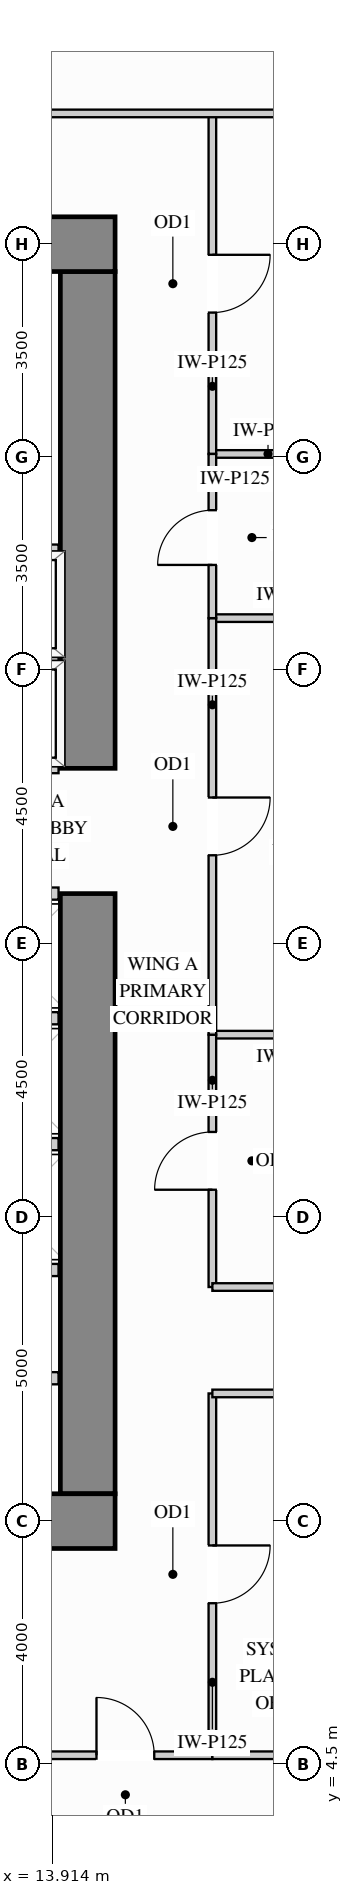
"""IFC4 building model, lengths in metres.
Left out: names, types, materials, properties, quantities, classifications, styles, units other than length and angle.
Written with IfcOpenShell. Run it as: python <this file> out.ifc"""

import sys

from ifc_helpers import new_model, si_unit, direction, frame, frame_2d, origin, place, context, subcontext, project, spatial, rectangle, extrude, source, transform, mapped, element, fill, save


model = new_model("IFC4")
c1 = context("Model", 3, precision=1e-05, world=origin(), true_north=direction((0.0, 1.0)))
c2 = subcontext(c1, "Body", "Model", "MODEL_VIEW")
j1 = project(units=[si_unit("LENGTHUNIT", "METRE"), si_unit("PLANEANGLEUNIT", "RADIAN")], contexts=[c1])
p1 = place(None, origin())
s1 = spatial("IfcSite", under=j1, at=p1, CompositionType="ELEMENT")
p2 = place(p1, origin())
s2 = spatial("IfcBuilding", under=s1, at=p2, CompositionType="ELEMENT")
p3 = place(p2, frame((0.0, 0.0, 22.5)))
s3 = spatial("IfcBuildingStorey", under=s2, at=p3, CompositionType="ELEMENT", Elevation=22.5)
m1 = source(origin(), c2, "Body", "SweptSolid", [
    extrude(rectangle(XDim=9.87, YDim=0.9, at=frame_2d((4.935, 0.0))), origin(), (0.0, 0.0, 1.0), 3.38),
])
p4 = place(p3, frame((14.5, 8.95, 0.0), z_axis=(0.0, 0.0, 1.0), x_axis=(0.0, 1.0, 0.0)))
e1 = element("IfcWall", 1, at=p4, inside=s3, PredefinedType="SHEAR", context=c2, shape_type="MappedRepresentation", body=[
    mapped(m1, transform((0.0, 0.0, 0.0), x_axis=(1.0, 0.0, 0.0), y_axis=(0.0, 1.0, 0.0), z_axis=(0.0, 0.0, 1.0))),
])
m2 = source(origin(), c2, "Body", "SweptSolid", [
    extrude(rectangle(XDim=8.17, YDim=0.9, at=frame_2d((4.085, 0.0))), origin(), (0.0, 0.0, 1.0), 3.38),
])
p5 = place(p3, frame((14.5, 20.88, 0.0), z_axis=(0.0, 0.0, 1.0), x_axis=(0.0, 1.0, 0.0)))
e2 = element("IfcWall", 2, at=p5, inside=s3, PredefinedType="SHEAR", context=c2, shape_type="MappedRepresentation", body=[
    mapped(m2, transform((0.0, 0.0, 0.0), x_axis=(1.0, 0.0, 0.0), y_axis=(0.0, 1.0, 0.0), z_axis=(0.0, 0.0, 1.0))),
])
m3 = source(origin(), c2, "Body", "SweptSolid", [
    extrude(rectangle(XDim=10.9, YDim=0.9, at=frame_2d((5.45, 0.0))), origin(), (0.0, 0.0, 1.0), 3.38),
])
for number, where, z_axis, x_axis in (
    (3, (4.05, 29.5, 0.0), (0.0, 0.0, 1.0), (1.0, 0.0, 0.0)),
    (4, (4.05, 8.5, 0.0), (0.0, 0.0, 1.0), (1.0, 0.0, 0.0)),
):
    element("IfcWall", number, at=place(p3, frame(where, z_axis=z_axis, x_axis=x_axis)), inside=s3, PredefinedType="SHEAR", context=c2, shape_type="MappedRepresentation", body=[
        mapped(m3, transform((0.0, 0.0, 0.0), x_axis=(1.0, 0.0, 0.0), y_axis=(0.0, 1.0, 0.0), z_axis=(0.0, 0.0, 1.0))),
    ])
m4 = source(origin(), c2, "Body", "SweptSolid", [
    extrude(rectangle(XDim=2.6, YDim=0.125, at=frame_2d((1.3, 0.0))), origin(), (0.0, 0.0, 1.0), 2.896),
])
p6 = place(p3, frame((16.55, 16.5, 0.0), z_axis=(0.0, 0.0, 1.0), x_axis=(1.0, 0.0, 0.0)))
e5 = element("IfcWall", 5, at=p6, inside=s3, PredefinedType="PARTITIONING", context=c2, shape_type="MappedRepresentation", body=[
    mapped(m4, transform((0.0, 0.0, 0.0), x_axis=(1.0, 0.0, 0.0), y_axis=(0.0, 1.0, 0.0), z_axis=(0.0, 0.0, 1.0))),
])
m5 = source(origin(), c2, "Body", "SweptSolid", [
    extrude(rectangle(XDim=2.598, YDim=0.125, at=frame_2d((1.299, 0.0))), origin(), (0.0, 0.0, 1.0), 3.365),
])
for number, where, z_axis, x_axis in (
    (6, (16.55, 23.35, 0.0), (0.0, 0.0, 1.0), (1.0, 0.0, 0.0)),
    (7, (16.55, 26.05, 0.0), (0.0, 0.0, 1.0), (1.0, 0.0, 0.0)),
):
    element("IfcWall", number, at=place(p3, frame(where, z_axis=z_axis, x_axis=x_axis)), inside=s3, PredefinedType="PARTITIONING", context=c2, shape_type="MappedRepresentation", body=[
        mapped(m5, transform((0.0, 0.0, 0.0), x_axis=(1.0, 0.0, 0.0), y_axis=(0.0, 1.0, 0.0), z_axis=(0.0, 0.0, 1.0))),
    ])
p7 = place(p3, frame((16.55, 12.35, 0.0), z_axis=(0.0, 0.0, 1.0), x_axis=(0.0, 1.0, 0.0)))
e8 = element("IfcWall", 8, at=p7, inside=s3, PredefinedType="PARTITIONING", context=c2, shape_type="SweptSolid", body=[
    extrude(rectangle(XDim=4.15, YDim=0.125, at=frame_2d((2.075, 0.0))), origin(), (0.0, 0.0, 1.0), 3.365),
])
p8 = place(p7, frame((1.6, 0.0, 0.0)))
e9 = element("IfcOpeningElement", 9, at=p8, cuts=e8, PredefinedType="OPENING", context=c2, shape_type="SweptSolid", body=[
    extrude(rectangle(XDim=0.95, YDim=2.15, at=frame_2d((0.475, 1.075))), frame((0.0, 0.073, 0.0), z_axis=(0.0, -1.0, 0.0), x_axis=(1.0, 0.0, 0.0)), (0.0, 0.0, 1.0), 0.145),
])
p9 = place(p3, frame((16.55, 16.5, 0.0), z_axis=(0.0, 0.0, 1.0), x_axis=(0.0, 1.0, 0.0)))
e10 = element("IfcWall", 10, at=p9, inside=s3, PredefinedType="PARTITIONING", context=c2, shape_type="SweptSolid", body=[
    extrude(rectangle(XDim=6.85, YDim=0.125, at=frame_2d((3.425, 0.0))), origin(), (0.0, 0.0, 1.0), 3.365),
])
p10 = place(p9, frame((2.95, 0.0, 0.0)))
e11 = element("IfcOpeningElement", 11, at=p10, cuts=e10, PredefinedType="OPENING", context=c2, shape_type="SweptSolid", body=[
    extrude(rectangle(XDim=0.95, YDim=2.15, at=frame_2d((0.475, 1.075))), frame((0.0, 0.073, 0.0), z_axis=(0.0, -1.0, 0.0), x_axis=(1.0, 0.0, 0.0)), (0.0, 0.0, 1.0), 0.145),
])
p11 = place(p3, frame((16.55, 26.05, 0.0), z_axis=(0.0, 0.0, 1.0), x_axis=(0.0, 1.0, 0.0)))
e12 = element("IfcWall", 12, at=p11, inside=s3, PredefinedType="PARTITIONING", context=c2, shape_type="SweptSolid", body=[
    extrude(rectangle(XDim=5.6, YDim=0.125, at=frame_2d((2.8, 0.0))), origin(), (0.0, 0.0, 1.0), 3.365),
])
p12 = place(p11, frame((2.325, 0.0, 0.0)))
e13 = element("IfcOpeningElement", 13, at=p12, cuts=e12, PredefinedType="OPENING", context=c2, shape_type="SweptSolid", body=[
    extrude(rectangle(XDim=0.95, YDim=2.15, at=frame_2d((0.475, 1.075))), frame((0.0, 0.073, 0.0), z_axis=(0.0, -1.0, 0.0), x_axis=(1.0, 0.0, 0.0)), (0.0, 0.0, 1.0), 0.145),
])
p13 = place(p3, frame((16.55, 4.65, 0.0), z_axis=(0.0, 0.0, 1.0), x_axis=(0.0, 1.0, 0.0)))
e14 = element("IfcWall", 14, at=p13, inside=s3, PredefinedType="PARTITIONING", context=c2, shape_type="SweptSolid", body=[
    extrude(rectangle(XDim=5.95, YDim=0.125, at=frame_2d((2.975, 0.0))), origin(), (0.0, 0.0, 1.0), 3.365),
])
p14 = place(p13, frame((2.5, 0.0, 0.0)))
e15 = element("IfcOpeningElement", 15, at=p14, cuts=e14, PredefinedType="OPENING", context=c2, shape_type="SweptSolid", body=[
    extrude(rectangle(XDim=0.95, YDim=2.15, at=frame_2d((0.475, 1.075))), frame((0.0, 0.073, 0.0), z_axis=(0.0, -1.0, 0.0), x_axis=(1.0, 0.0, 0.0)), (0.0, 0.0, 1.0), 0.145),
])
p15 = place(p3, frame((16.55, 23.35, 0.0), z_axis=(0.0, 0.0, 1.0), x_axis=(0.0, 1.0, 0.0)))
e16 = element("IfcWall", 16, at=p15, inside=s3, PredefinedType="PARTITIONING", context=c2, shape_type="SweptSolid", body=[
    extrude(rectangle(XDim=2.7, YDim=0.125, at=frame_2d((1.35, 0.0))), origin(), (0.0, 0.0, 1.0), 3.365),
])
p16 = place(p15, frame((0.875, 0.0, 0.0)))
e17 = element("IfcOpeningElement", 17, at=p16, cuts=e16, PredefinedType="OPENING", context=c2, shape_type="SweptSolid", body=[
    extrude(rectangle(XDim=0.9, YDim=2.15, at=frame_2d((0.45, 1.075))), frame((0.0, 0.073, 0.0), z_axis=(0.0, -1.0, 0.0), x_axis=(1.0, 0.0, 0.0)), (0.0, 0.0, 1.0), 0.145),
])
m6 = source(origin(), c2, "Body", "SweptSolid", [
    extrude(rectangle(XDim=12.598, YDim=0.125, at=frame_2d((6.299, 0.0))), origin(), (0.0, 0.0, 1.0), 2.828),
])
p17 = place(p3, frame((6.55, 31.65, 0.0), z_axis=(0.0, 0.0, 1.0), x_axis=(1.0, 0.0, 0.0)))
e18 = element("IfcWall", 18, at=p17, inside=s3, PredefinedType="PARTITIONING", context=c2, shape_type="MappedRepresentation", body=[
    mapped(m6, transform((0.0, 0.0, 0.0), x_axis=(1.0, 0.0, 0.0), y_axis=(0.0, 1.0, 0.0), z_axis=(0.0, 0.0, 1.0))),
])
m7 = source(origin(), c2, "Body", "SweptSolid", [
    extrude(rectangle(XDim=2.95, YDim=0.125, at=frame_2d((1.475, 0.0))), origin(), (0.0, 0.0, 1.0), 3.365),
])
for number, where, z_axis, x_axis in (
    (19, (16.55, 12.35, 0.0), (0.0, 0.0, 1.0), (1.0, 0.0, 0.0)),
    (20, (16.55, 10.6, 0.0), (0.0, 0.0, 1.0), (1.0, 0.0, 0.0)),
):
    element("IfcWall", number, at=place(p3, frame(where, z_axis=z_axis, x_axis=x_axis)), inside=s3, PredefinedType="PARTITIONING", context=c2, shape_type="MappedRepresentation", body=[
        mapped(m7, transform((0.0, 0.0, 0.0), x_axis=(1.0, 0.0, 0.0), y_axis=(0.0, 1.0, 0.0), z_axis=(0.0, 0.0, 1.0))),
    ])
p18 = place(p3, frame((13.688, 4.65, 0.0), z_axis=(0.0, 0.0, 1.0), x_axis=(1.0, 0.0, 0.0)))
e21 = element("IfcWall", 21, at=p18, inside=s3, PredefinedType="PARTITIONING", context=c2, shape_type="SweptSolid", body=[
    extrude(rectangle(XDim=2.862, YDim=0.125, at=frame_2d((1.431, 0.0))), origin(), (0.0, 0.0, 1.0), 2.828),
])
p19 = place(p18, frame((0.956, 0.0, 0.0)))
e22 = element("IfcOpeningElement", 22, at=p19, cuts=e21, PredefinedType="OPENING", context=c2, shape_type="SweptSolid", body=[
    extrude(rectangle(XDim=0.95, YDim=2.15, at=frame_2d((0.475, 1.075))), frame((0.0, 0.073, 0.0), z_axis=(0.0, -1.0, 0.0), x_axis=(1.0, 0.0, 0.0)), (0.0, 0.0, 1.0), 0.145),
])
m8 = source(origin(), c2, "Body", "SweptSolid", [
    extrude(rectangle(XDim=2.598, YDim=0.125, at=frame_2d((1.299, 0.0))), origin(), (0.0, 0.0, 1.0), 2.828),
])
p20 = place(p3, frame((16.55, 4.65, 0.0), z_axis=(0.0, 0.0, 1.0), x_axis=(1.0, 0.0, 0.0)))
e23 = element("IfcWall", 23, at=p20, inside=s3, PredefinedType="PARTITIONING", context=c2, shape_type="MappedRepresentation", body=[
    mapped(m8, transform((0.0, 0.0, 0.0), x_axis=(1.0, 0.0, 0.0), y_axis=(0.0, 1.0, 0.0), z_axis=(0.0, 0.0, 1.0))),
])
m9 = source(origin(), c2, "Body", "SweptSolid", [
    extrude(rectangle(XDim=1.6, YDim=0.2, at=frame_2d((0.8, 0.0))), origin(), (0.0, 0.0, 1.0), 3.365),
])
p21 = place(p3, frame((12.42, 10.85, 0.0), z_axis=(0.0, 0.0, 1.0), x_axis=(1.0, 0.0, 0.0)))
e24 = element("IfcWall", 24, at=p21, inside=s3, PredefinedType="PARTITIONING", context=c2, shape_type="MappedRepresentation", body=[
    mapped(m9, transform((0.0, 0.0, 0.0), x_axis=(1.0, 0.0, 0.0), y_axis=(0.0, 1.0, 0.0), z_axis=(0.0, 0.0, 1.0))),
])
m10 = source(origin(), c2, "Body", "SweptSolid", [
    extrude(rectangle(XDim=2.19, YDim=0.2, at=frame_2d((1.095, 0.0))), origin(), (0.0, 0.0, 1.0), 3.365),
])
for number, where, z_axis, x_axis in (
    (25, (11.83, 22.66, 0.0), (0.0, 0.0, 1.0), (1.0, 0.0, 0.0)),
    (26, (11.83, 20.9, 0.0), (0.0, 0.0, 1.0), (1.0, 0.0, 0.0)),
    (27, (11.83, 24.46, 0.0), (0.0, 0.0, 1.0), (1.0, 0.0, 0.0)),
):
    element("IfcWall", number, at=place(p3, frame(where, z_axis=z_axis, x_axis=x_axis)), inside=s3, PredefinedType="PARTITIONING", context=c2, shape_type="MappedRepresentation", body=[
        mapped(m10, transform((0.0, 0.0, 0.0), x_axis=(1.0, 0.0, 0.0), y_axis=(0.0, 1.0, 0.0), z_axis=(0.0, 0.0, 1.0))),
    ])
m11 = source(origin(), c2, "Body", "SweptSolid", [
    extrude(rectangle(XDim=1.79, YDim=0.2, at=frame_2d((0.895, 0.0))), origin(), (0.0, 0.0, 1.0), 3.365),
])
for number, where, z_axis, x_axis in (
    (28, (12.23, 14.7, 0.0), (0.0, 0.0, 1.0), (1.0, 0.0, 0.0)),
    (29, (12.23, 12.63, 0.0), (0.0, 0.0, 1.0), (1.0, 0.0, 0.0)),
    (30, (12.23, 16.77, 0.0), (0.0, 0.0, 1.0), (1.0, 0.0, 0.0)),
    (31, (12.23, 18.82, 0.0), (0.0, 0.0, 1.0), (1.0, 0.0, 0.0)),
):
    element("IfcWall", number, at=place(p3, frame(where, z_axis=z_axis, x_axis=x_axis)), inside=s3, PredefinedType="PARTITIONING", context=c2, shape_type="MappedRepresentation", body=[
        mapped(m11, transform((0.0, 0.0, 0.0), x_axis=(1.0, 0.0, 0.0), y_axis=(0.0, 1.0, 0.0), z_axis=(0.0, 0.0, 1.0))),
    ])
m12 = source(origin(), c2, "Body", "SweptSolid", [
    extrude(rectangle(XDim=0.95, YDim=2.15, at=frame_2d((0.475, 1.075))), frame((0.0, 0.025, 0.0), z_axis=(0.0, -1.0, 0.0), x_axis=(1.0, 0.0, 0.0)), (0.0, 0.0, 1.0), 0.05),
])
p22 = place(p14, origin())
e32 = element("IfcDoor", 32, at=p22, inside=s3, OperationType="SINGLE_SWING_RIGHT", PredefinedType="DOOR", context=c2, shape_type="MappedRepresentation", body=[
    mapped(m12, transform((0.0, 0.0, 0.0), x_axis=(1.0, 0.0, 0.0), y_axis=(0.0, 1.0, 0.0), z_axis=(0.0, 0.0, 1.0))),
])
fill(e15, e32)
p23 = place(p8, origin())
e33 = element("IfcDoor", 33, at=p23, inside=s3, OperationType="SINGLE_SWING_LEFT", PredefinedType="DOOR", context=c2, shape_type="MappedRepresentation", body=[
    mapped(m12, transform((0.0, 0.0, 0.0), x_axis=(1.0, 0.0, 0.0), y_axis=(0.0, 1.0, 0.0), z_axis=(0.0, 0.0, 1.0))),
])
fill(e9, e33)
p24 = place(p10, origin())
e34 = element("IfcDoor", 34, at=p24, inside=s3, OperationType="SINGLE_SWING_RIGHT", PredefinedType="DOOR", context=c2, shape_type="MappedRepresentation", body=[
    mapped(m12, transform((0.0, 0.0, 0.0), x_axis=(1.0, 0.0, 0.0), y_axis=(0.0, 1.0, 0.0), z_axis=(0.0, 0.0, 1.0))),
])
fill(e11, e34)
p25 = place(p12, origin())
e35 = element("IfcDoor", 35, at=p25, inside=s3, OperationType="SINGLE_SWING_RIGHT", PredefinedType="DOOR", context=c2, shape_type="MappedRepresentation", body=[
    mapped(m12, transform((0.0, 0.0, 0.0), x_axis=(1.0, 0.0, 0.0), y_axis=(0.0, 1.0, 0.0), z_axis=(0.0, 0.0, 1.0))),
])
fill(e13, e35)
p26 = place(p19, origin())
e36 = element("IfcDoor", 36, at=p26, inside=s3, OperationType="SINGLE_SWING_LEFT", PredefinedType="DOOR", context=c2, shape_type="MappedRepresentation", body=[
    mapped(m12, transform((0.0, 0.0, 0.0), x_axis=(1.0, 0.0, 0.0), y_axis=(0.0, 1.0, 0.0), z_axis=(0.0, 0.0, 1.0))),
])
fill(e22, e36)
m13 = source(origin(), c2, "Body", "SweptSolid", [
    extrude(rectangle(XDim=0.9, YDim=2.15, at=frame_2d((0.45, 1.075))), frame((0.0, 0.025, 0.0), z_axis=(0.0, -1.0, 0.0), x_axis=(1.0, 0.0, 0.0)), (0.0, 0.0, 1.0), 0.05),
])
p27 = place(p16, origin())
e37 = element("IfcDoor", 37, at=p27, inside=s3, OperationType="SINGLE_SWING_LEFT", PredefinedType="DOOR", context=c2, shape_type="MappedRepresentation", body=[
    mapped(m13, transform((0.0, 0.0, 0.0), x_axis=(1.0, 0.0, 0.0), y_axis=(0.0, 1.0, 0.0), z_axis=(0.0, 0.0, 1.0))),
])
fill(e17, e37)
save(model, sys.argv[1])
